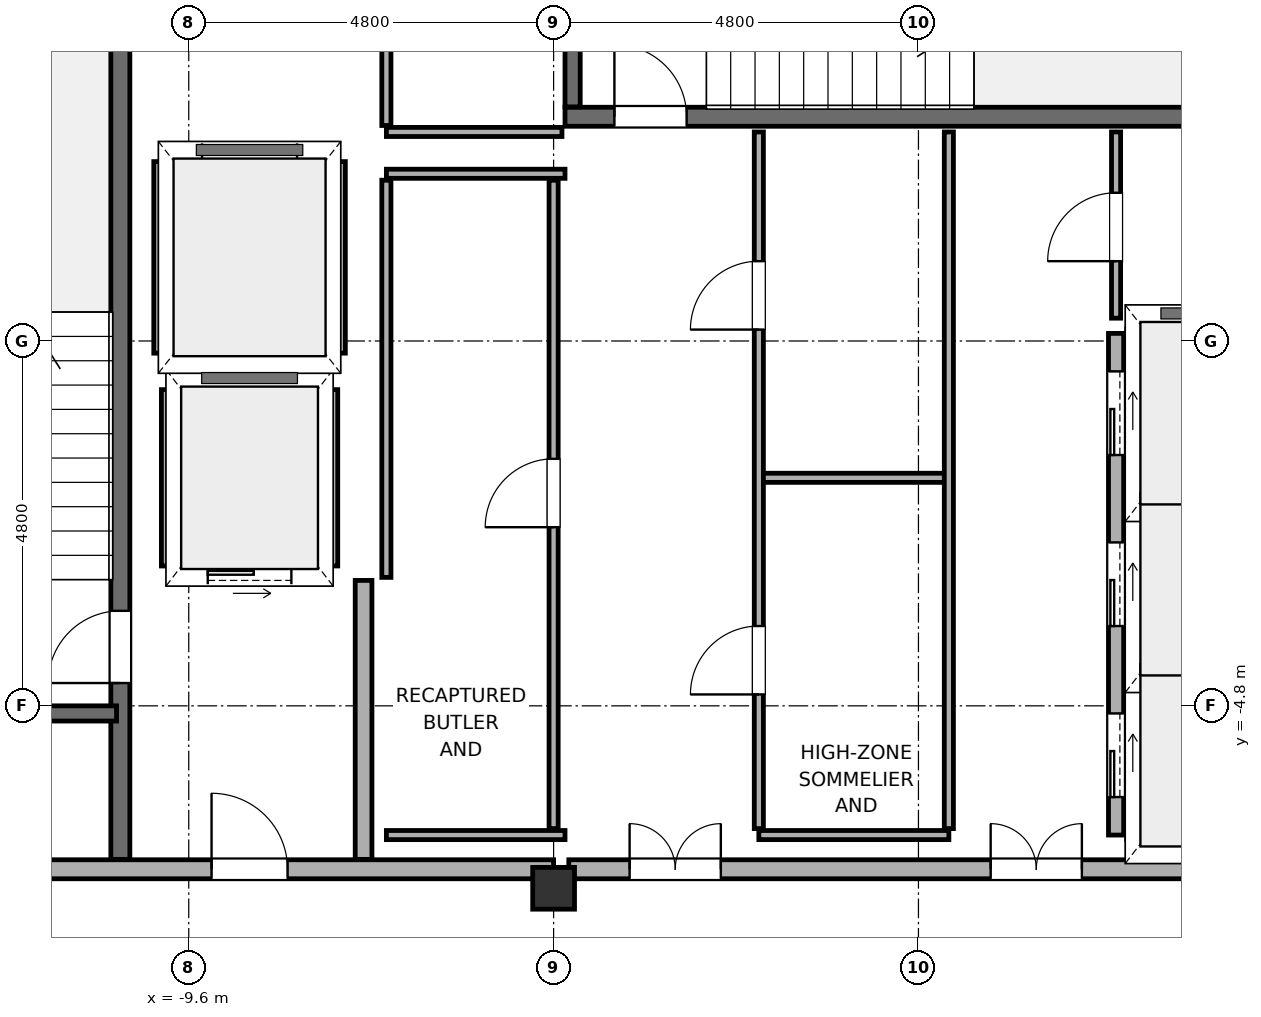
"""IFC4 building model, lengths in metres.
Left out: names, types, materials, properties, quantities, classifications, styles, units other than length and angle.
Written with IfcOpenShell. Run it as: python <this file> out.ifc"""

import sys

from ifc_helpers import new_model, si_unit, direction, frame, frame_2d, origin, origin_2d, place, context, subcontext, project, spatial, rectangle, hollow_rectangle, extrude, element, fill, save


model = new_model("IFC4")
c1 = context("Model", 3, precision=1e-05, world=origin(), true_north=direction((0.0, 1.0)))
c2 = subcontext(c1, "Body", "Model", "MODEL_VIEW")
j1 = project(units=[si_unit("LENGTHUNIT", "METRE"), si_unit("PLANEANGLEUNIT", "RADIAN")], contexts=[c1])
p1 = place(None, origin())
s1 = spatial("IfcSite", under=j1, at=p1, CompositionType="ELEMENT")
p2 = place(p1, origin())
s2 = spatial("IfcBuilding", under=s1, at=p2, CompositionType="ELEMENT")
p3 = place(p2, frame((0.0, 0.0, 282.2)))
s3 = spatial("IfcBuildingStorey", under=s2, at=p3, CompositionType="ELEMENT", Elevation=282.2)
p4 = place(p3, frame((-4.8, -7.2, 0.0), z_axis=(0.0, 0.0, 1.0), x_axis=(1.0, 0.0, 0.0)))
e1 = element("IfcColumn", 1, at=p4, inside=s3, PredefinedType="COLUMN", context=c2, shape_type="SweptSolid", body=[
    extrude(hollow_rectangle(XDim=0.55, YDim=0.55, WallThickness=0.025, at=origin_2d()), origin(), (0.0, 0.0, 1.0), 4.2),
])
p5 = place(p3, frame((-14.2, -6.95, 0.0), z_axis=(0.0, 0.0, 1.0), x_axis=(1.0, 0.0, 0.0)))
e2 = element("IfcWall", 2, at=p5, inside=s3, PredefinedType="SOLIDWALL", context=c2, shape_type="SweptSolid", body=[
    extrude(rectangle(XDim=9.4, YDim=0.25, at=frame_2d((4.7, 0.0))), origin(), (0.0, 0.0, 1.0), 2.6),
])
p6 = place(p5, frame((4.9, 0.0, 0.0)))
e3 = element("IfcOpeningElement", 3, at=p6, cuts=e2, PredefinedType="OPENING", context=c2, shape_type="SweptSolid", body=[
    extrude(rectangle(XDim=1.0, YDim=2.15, at=frame_2d((0.5, 1.075))), frame((0.0, 0.14, 0.0), z_axis=(0.0, -1.0, 0.0), x_axis=(1.0, 0.0, 0.0)), (0.0, 0.0, 1.0), 0.28),
])
p7 = place(p3, frame((-4.6, -6.95, 0.0), z_axis=(0.0, 0.0, 1.0), x_axis=(1.0, 0.0, 0.0)))
e4 = element("IfcWall", 4, at=p7, inside=s3, PredefinedType="SOLIDWALL", context=c2, shape_type="SweptSolid", body=[
    extrude(rectangle(XDim=9.2, YDim=0.25, at=frame_2d((4.6, 0.0))), origin(), (0.0, 0.0, 1.0), 2.8),
])
p8 = place(p7, frame((0.8, 0.0, 0.0)))
e5 = element("IfcOpeningElement", 5, at=p8, cuts=e4, PredefinedType="OPENING", context=c2, shape_type="SweptSolid", body=[
    extrude(rectangle(XDim=1.2, YDim=2.2, at=frame_2d((0.6, 1.1))), frame((0.0, 0.14, 0.0), z_axis=(0.0, -1.0, 0.0), x_axis=(1.0, 0.0, 0.0)), (0.0, 0.0, 1.0), 0.28),
])
p9 = place(p7, frame((5.55, 0.0, 0.0)))
e6 = element("IfcOpeningElement", 6, at=p9, cuts=e4, PredefinedType="OPENING", context=c2, shape_type="SweptSolid", body=[
    extrude(rectangle(XDim=1.2, YDim=2.2, at=frame_2d((0.6, 1.1))), frame((0.0, 0.14, 0.0), z_axis=(0.0, -1.0, 0.0), x_axis=(1.0, 0.0, 0.0)), (0.0, 0.0, 1.0), 0.28),
])
p10 = place(p3, frame((-7.3, -6.82, 0.0), z_axis=(0.0, 0.0, 1.0), x_axis=(0.0, 1.0, 0.0)))
e7 = element("IfcWall", 7, at=p10, inside=s3, PredefinedType="SOLIDWALL", context=c2, shape_type="SweptSolid", body=[
    extrude(rectangle(XDim=3.67, YDim=0.22, at=frame_2d((1.835, 0.0))), origin(), (0.0, 0.0, 1.0), 2.6),
])
p11 = place(p3, frame((-10.5, -6.82, -0.2), z_axis=(0.0, 0.0, 1.0), x_axis=(0.0, 1.0, 0.0)))
e8 = element("IfcWall", 8, at=p11, inside=s3, PredefinedType="SOLIDWALL", context=c2, shape_type="SweptSolid", body=[
    extrude(rectangle(XDim=13.64, YDim=0.25, at=frame_2d((6.82, 0.0))), origin(), (0.0, 0.0, 1.0), 4.2),
])
p12 = place(p11, frame((2.32, 0.0, 0.2)))
e9 = element("IfcOpeningElement", 9, at=p12, cuts=e8, PredefinedType="OPENING", context=c2, shape_type="SweptSolid", body=[
    extrude(rectangle(XDim=0.95, YDim=2.15, at=frame_2d((0.475, 1.075))), frame((0.0, 0.14, 0.0), z_axis=(0.0, -1.0, 0.0), x_axis=(1.0, 0.0, 0.0)), (0.0, 0.0, 1.0), 0.28),
])
p13 = place(p3, frame((-14.2, -4.9, -0.2), z_axis=(0.0, 0.0, 1.0), x_axis=(1.0, 0.0, 0.0)))
e10 = element("IfcWall", 10, at=p13, inside=s3, PredefinedType="SOLIDWALL", context=c2, shape_type="SweptSolid", body=[
    extrude(rectangle(XDim=3.65, YDim=0.2, at=frame_2d((1.825, 0.0))), origin(), (0.0, 0.0, 1.0), 4.2),
])
p14 = place(p3, frame((-4.65, 2.95, -0.2), z_axis=(0.0, 0.0, 1.0), x_axis=(1.0, 0.0, 0.0)))
e11 = element("IfcWall", 11, at=p14, inside=s3, PredefinedType="SOLIDWALL", context=c2, shape_type="SweptSolid", body=[
    extrude(rectangle(XDim=9.9, YDim=0.25, at=frame_2d((4.95, 0.0))), origin(), (0.0, 0.0, 1.0), 4.2),
])
p15 = place(p14, frame((0.65, 0.0, 0.2)))
e12 = element("IfcOpeningElement", 12, at=p15, cuts=e11, PredefinedType="OPENING", context=c2, shape_type="SweptSolid", body=[
    extrude(rectangle(XDim=0.95, YDim=2.15, at=frame_2d((0.475, 1.075))), frame((0.0, 0.14, 0.0), z_axis=(0.0, -1.0, 0.0), x_axis=(1.0, 0.0, 0.0)), (0.0, 0.0, 1.0), 0.28),
])
p16 = place(p3, frame((-4.55, 3.08, -0.2), z_axis=(0.0, 0.0, 1.0), x_axis=(0.0, 1.0, 0.0)))
e13 = element("IfcWall", 13, at=p16, inside=s3, PredefinedType="SOLIDWALL", context=c2, shape_type="SweptSolid", body=[
    extrude(rectangle(XDim=3.74, YDim=0.2, at=frame_2d((1.87, 0.0))), origin(), (0.0, 0.0, 1.0), 4.2),
])
p17 = place(p3, frame((2.6, -6.5, 0.0), z_axis=(0.0, 0.0, 1.0), x_axis=(0.0, 1.0, 0.0)))
e14 = element("IfcWall", 14, at=p17, inside=s3, PredefinedType="SOLIDWALL", context=c2, shape_type="SweptSolid", body=[
    extrude(rectangle(XDim=6.6, YDim=0.2, at=frame_2d((3.3, 0.0))), origin(), (0.0, 0.0, 1.0), 4.0),
])
p18 = place(p17, frame((0.5, 0.0, 0.0)))
e15 = element("IfcOpeningElement", 15, at=p18, cuts=e14, PredefinedType="OPENING", context=c2, shape_type="SweptSolid", body=[
    extrude(rectangle(XDim=1.1, YDim=2.2, at=frame_2d((0.55, 1.1))), frame((0.0, 0.115, 0.0), z_axis=(0.0, -1.0, 0.0), x_axis=(1.0, 0.0, 0.0)), (0.0, 0.0, 1.0), 0.23),
])
p19 = place(p17, frame((2.75, 0.0, 0.0)))
e16 = element("IfcOpeningElement", 16, at=p19, cuts=e14, PredefinedType="OPENING", context=c2, shape_type="SweptSolid", body=[
    extrude(rectangle(XDim=1.1, YDim=2.2, at=frame_2d((0.55, 1.1))), frame((0.0, 0.115, 0.0), z_axis=(0.0, -1.0, 0.0), x_axis=(1.0, 0.0, 0.0)), (0.0, 0.0, 1.0), 0.23),
])
p20 = place(p17, frame((5.0, 0.0, 0.0)))
e17 = element("IfcOpeningElement", 17, at=p20, cuts=e14, PredefinedType="OPENING", context=c2, shape_type="SweptSolid", body=[
    extrude(rectangle(XDim=1.1, YDim=2.2, at=frame_2d((0.55, 1.1))), frame((0.0, 0.115, 0.0), z_axis=(0.0, -1.0, 0.0), x_axis=(1.0, 0.0, 0.0)), (0.0, 0.0, 1.0), 0.23),
])
for number, where, z_axis, x_axis in (
    (18, (2.74, -6.5, 0.0), (0.0, 0.0, 1.0), (1.0, 0.0, 0.0)),
    (19, (2.74, -4.325, 0.0), (0.0, 0.0, 1.0), (1.0, 0.0, 0.0)),
    (20, (2.74, -2.075, 0.0), (0.0, 0.0, 1.0), (1.0, 0.0, 0.0)),
    (21, (2.74, 0.1, 0.0), (0.0, 0.0, 1.0), (1.0, 0.0, 0.0)),
):
    element("IfcWall", number, at=place(p3, frame(where, z_axis=z_axis, x_axis=x_axis)), inside=s3, PredefinedType="PARTITIONING", context=c2, shape_type="SweptSolid", body=[
        extrude(rectangle(XDim=2.17, YDim=0.12, at=frame_2d((1.085, 0.0))), origin(), (0.0, 0.0, 1.0), 4.0),
    ])
p21 = place(p3, frame((-9.82, -3.1, 0.0), z_axis=(0.0, 0.0, 1.0), x_axis=(1.0, 0.0, 0.0)))
e22 = element("IfcWall", 22, at=p21, inside=s3, PredefinedType="SOLIDWALL", context=c2, shape_type="SweptSolid", body=[
    extrude(rectangle(XDim=2.04, YDim=0.2, at=frame_2d((1.02, 0.0))), origin(), (0.0, 0.0, 1.0), 4.0),
])
p22 = place(p21, frame((0.47, 0.0, 0.0)))
e23 = element("IfcOpeningElement", 23, at=p22, cuts=e22, PredefinedType="OPENING", context=c2, shape_type="SweptSolid", body=[
    extrude(rectangle(XDim=1.1, YDim=2.2, at=frame_2d((0.55, 1.1))), frame((0.0, 0.115, 0.0), z_axis=(0.0, -1.0, 0.0), x_axis=(1.0, 0.0, 0.0)), (0.0, 0.0, 1.0), 0.23),
])
p23 = place(p3, frame((-9.82, -0.5, 0.0), z_axis=(0.0, 0.0, 1.0), x_axis=(1.0, 0.0, 0.0)))
e24 = element("IfcWall", 24, at=p23, inside=s3, PredefinedType="SOLIDWALL", context=c2, shape_type="SweptSolid", body=[
    extrude(rectangle(XDim=2.04, YDim=0.2, at=frame_2d((1.02, 0.0))), origin(), (0.0, 0.0, 1.0), 4.0),
])
for number, where, z_axis, x_axis in (
    (25, (-9.9, -2.96, 0.0), (0.0, 0.0, 1.0), (0.0, 1.0, 0.0)),
    (26, (-7.7, -2.96, 0.0), (0.0, 0.0, 1.0), (0.0, 1.0, 0.0)),
):
    element("IfcWall", number, at=place(p3, frame(where, z_axis=z_axis, x_axis=x_axis)), inside=s3, PredefinedType="PARTITIONING", context=c2, shape_type="SweptSolid", body=[
        extrude(rectangle(XDim=2.32, YDim=0.12, at=frame_2d((1.16, 0.0))), origin(), (0.0, 0.0, 1.0), 4.0),
    ])
p24 = place(p3, frame((-9.92, 2.5, 0.0), z_axis=(0.0, 0.0, 1.0), x_axis=(1.0, 0.0, 0.0)))
e27 = element("IfcWall", 27, at=p24, inside=s3, PredefinedType="SOLIDWALL", context=c2, shape_type="SweptSolid", body=[
    extrude(rectangle(XDim=2.24, YDim=0.2, at=frame_2d((1.12, 0.0))), origin(), (0.0, 0.0, 1.0), 4.0),
])
p25 = place(p24, frame((0.495, 0.0, 0.0)))
e28 = element("IfcOpeningElement", 28, at=p25, cuts=e27, PredefinedType="OPENING", context=c2, shape_type="SweptSolid", body=[
    extrude(rectangle(XDim=1.25, YDim=2.25, at=frame_2d((0.625, 1.125))), frame((0.0, 0.115, 0.0), z_axis=(0.0, -1.0, 0.0), x_axis=(1.0, 0.0, 0.0)), (0.0, 0.0, 1.0), 0.23),
])
p26 = place(p3, frame((-9.92, -0.3, 0.0), z_axis=(0.0, 0.0, 1.0), x_axis=(1.0, 0.0, 0.0)))
e29 = element("IfcWall", 29, at=p26, inside=s3, PredefinedType="SOLIDWALL", context=c2, shape_type="SweptSolid", body=[
    extrude(rectangle(XDim=2.24, YDim=0.2, at=frame_2d((1.12, 0.0))), origin(), (0.0, 0.0, 1.0), 4.0),
])
for number, where, z_axis, x_axis in (
    (30, (-10.0, -0.16, 0.0), (0.0, 0.0, 1.0), (0.0, 1.0, 0.0)),
    (31, (-7.6, -0.16, 0.0), (0.0, 0.0, 1.0), (0.0, 1.0, 0.0)),
):
    element("IfcWall", number, at=place(p3, frame(where, z_axis=z_axis, x_axis=x_axis)), inside=s3, PredefinedType="PARTITIONING", context=c2, shape_type="SweptSolid", body=[
        extrude(rectangle(XDim=2.52, YDim=0.12, at=frame_2d((1.26, 0.0))), origin(), (0.0, 0.0, 1.0), 4.0),
    ])
p27 = place(p3, frame((-7.0, -6.5, 0.0), z_axis=(0.0, 0.0, 1.0), x_axis=(1.0, 0.0, 0.0)))
e32 = element("IfcWall", 32, at=p27, inside=s3, PredefinedType="PARTITIONING", context=c2, shape_type="SweptSolid", body=[
    extrude(rectangle(XDim=2.35, YDim=0.12, at=frame_2d((1.175, 0.0))), origin(), (0.0, 0.0, 1.0), 4.0),
])
for number, where, z_axis, x_axis in (
    (33, (-2.1, -6.5, 0.0), (0.0, 0.0, 1.0), (1.0, 0.0, 0.0)),
    (34, (-2.1, -1.8, 0.0), (0.0, 0.0, 1.0), (1.0, 0.0, 0.0)),
):
    element("IfcWall", number, at=place(p3, frame(where, z_axis=z_axis, x_axis=x_axis)), inside=s3, PredefinedType="PARTITIONING", context=c2, shape_type="SweptSolid", body=[
        extrude(rectangle(XDim=2.5, YDim=0.12, at=frame_2d((1.25, 0.0))), origin(), (0.0, 0.0, 1.0), 4.0),
    ])
p28 = place(p3, frame((-7.0, 2.2, 0.0), z_axis=(0.0, 0.0, 1.0), x_axis=(1.0, 0.0, 0.0)))
e35 = element("IfcWall", 35, at=p28, inside=s3, PredefinedType="PARTITIONING", context=c2, shape_type="SweptSolid", body=[
    extrude(rectangle(XDim=2.35, YDim=0.12, at=frame_2d((1.175, 0.0))), origin(), (0.0, 0.0, 1.0), 4.0),
])
p29 = place(p3, frame((-7.0, 2.75, 0.0), z_axis=(0.0, 0.0, 1.0), x_axis=(1.0, 0.0, 0.0)))
e36 = element("IfcWall", 36, at=p29, inside=s3, PredefinedType="PARTITIONING", context=c2, shape_type="SweptSolid", body=[
    extrude(rectangle(XDim=2.31, YDim=0.12, at=frame_2d((1.155, 0.0))), origin(), (0.0, 0.0, 1.0), 4.0),
])
p30 = place(p3, frame((-7.0, -3.11, 0.0), z_axis=(0.0, 0.0, 1.0), x_axis=(0.0, 1.0, 0.0)))
e37 = element("IfcWall", 37, at=p30, inside=s3, PredefinedType="PARTITIONING", context=c2, shape_type="SweptSolid", body=[
    extrude(rectangle(XDim=5.225, YDim=0.12, at=frame_2d((2.613, 0.0))), origin(), (0.0, 0.0, 1.0), 4.0),
])
p31 = place(p3, frame((-7.0, 2.835, 0.0), z_axis=(0.0, 0.0, 1.0), x_axis=(0.0, 1.0, 0.0)))
e38 = element("IfcWall", 38, at=p31, inside=s3, PredefinedType="PARTITIONING", context=c2, shape_type="SweptSolid", body=[
    extrude(rectangle(XDim=3.715, YDim=0.12, at=frame_2d((1.857, 0.0))), origin(), (0.0, 0.0, 1.0), 4.0),
])
p32 = place(p31, frame((1.365, 0.0, 0.0)))
e39 = element("IfcOpeningElement", 39, at=p32, cuts=e38, PredefinedType="OPENING", context=c2, shape_type="SweptSolid", body=[
    extrude(rectangle(XDim=0.9, YDim=2.1, at=frame_2d((0.45, 1.05))), frame((0.0, 0.075, 0.0), z_axis=(0.0, -1.0, 0.0), x_axis=(1.0, 0.0, 0.0)), (0.0, 0.0, 1.0), 0.15),
])
p33 = place(p3, frame((-4.8, -6.415, 0.0), z_axis=(0.0, 0.0, 1.0), x_axis=(0.0, 1.0, 0.0)))
e40 = element("IfcWall", 40, at=p33, inside=s3, PredefinedType="PARTITIONING", context=c2, shape_type="SweptSolid", body=[
    extrude(rectangle(XDim=8.53, YDim=0.12, at=frame_2d((4.265, 0.0))), origin(), (0.0, 0.0, 1.0), 4.0),
])
p34 = place(p33, frame((3.965, 0.0, 0.0)))
e41 = element("IfcOpeningElement", 41, at=p34, cuts=e40, PredefinedType="OPENING", context=c2, shape_type="SweptSolid", body=[
    extrude(rectangle(XDim=0.9, YDim=2.1, at=frame_2d((0.45, 1.05))), frame((0.0, 0.075, 0.0), z_axis=(0.0, -1.0, 0.0), x_axis=(1.0, 0.0, 0.0)), (0.0, 0.0, 1.0), 0.15),
])
p35 = place(p3, frame((-2.1, -6.415, 0.0), z_axis=(0.0, 0.0, 1.0), x_axis=(0.0, 1.0, 0.0)))
e42 = element("IfcWall", 42, at=p35, inside=s3, PredefinedType="PARTITIONING", context=c2, shape_type="SweptSolid", body=[
    extrude(rectangle(XDim=9.165, YDim=0.12, at=frame_2d((4.583, 0.0))), origin(), (0.0, 0.0, 1.0), 4.0),
])
p36 = place(p35, frame((1.765, 0.0, 0.0)))
e43 = element("IfcOpeningElement", 43, at=p36, cuts=e42, PredefinedType="OPENING", context=c2, shape_type="SweptSolid", body=[
    extrude(rectangle(XDim=0.9, YDim=2.1, at=frame_2d((0.45, 1.05))), frame((0.0, 0.075, 0.0), z_axis=(0.0, -1.0, 0.0), x_axis=(1.0, 0.0, 0.0)), (0.0, 0.0, 1.0), 0.15),
])
p37 = place(p35, frame((6.565, 0.0, 0.0)))
e44 = element("IfcOpeningElement", 44, at=p37, cuts=e42, PredefinedType="OPENING", context=c2, shape_type="SweptSolid", body=[
    extrude(rectangle(XDim=0.9, YDim=2.1, at=frame_2d((0.45, 1.05))), frame((0.0, 0.075, 0.0), z_axis=(0.0, -1.0, 0.0), x_axis=(1.0, 0.0, 0.0)), (0.0, 0.0, 1.0), 0.15),
])
p38 = place(p3, frame((0.4, -6.415, 0.0), z_axis=(0.0, 0.0, 1.0), x_axis=(0.0, 1.0, 0.0)))
e45 = element("IfcWall", 45, at=p38, inside=s3, PredefinedType="PARTITIONING", context=c2, shape_type="SweptSolid", body=[
    extrude(rectangle(XDim=9.165, YDim=0.12, at=frame_2d((4.583, 0.0))), origin(), (0.0, 0.0, 1.0), 4.0),
])
p39 = place(p3, frame((2.6, 0.3, 0.0), z_axis=(0.0, 0.0, 1.0), x_axis=(0.0, 1.0, 0.0)))
e46 = element("IfcWall", 46, at=p39, inside=s3, PredefinedType="PARTITIONING", context=c2, shape_type="SweptSolid", body=[
    extrude(rectangle(XDim=2.45, YDim=0.12, at=frame_2d((1.225, 0.0))), origin(), (0.0, 0.0, 1.0), 4.0),
])
p40 = place(p39, frame((0.75, 0.0, 0.0)))
e47 = element("IfcOpeningElement", 47, at=p40, cuts=e46, PredefinedType="OPENING", context=c2, shape_type="SweptSolid", body=[
    extrude(rectangle(XDim=0.9, YDim=2.1, at=frame_2d((0.45, 1.05))), frame((0.0, 0.075, 0.0), z_axis=(0.0, -1.0, 0.0), x_axis=(1.0, 0.0, 0.0)), (0.0, 0.0, 1.0), 0.15),
])
p41 = place(p6, origin())
e48 = element("IfcDoor", 48, at=p41, inside=s3, OperationType="SINGLE_SWING_RIGHT", PredefinedType="DOOR", context=c2, shape_type="SweptSolid", body=[
    extrude(rectangle(XDim=1.0, YDim=2.15, at=frame_2d((0.5, 1.075))), frame((0.0, 0.025, 0.0), z_axis=(0.0, -1.0, 0.0), x_axis=(1.0, 0.0, 0.0)), (0.0, 0.0, 1.0), 0.05),
])
fill(e3, e48)
p42 = place(p8, origin())
e49 = element("IfcDoor", 49, at=p42, inside=s3, OperationType="DOUBLE_DOOR_SINGLE_SWING", PredefinedType="DOOR", context=c2, shape_type="SweptSolid", body=[
    extrude(rectangle(XDim=1.2, YDim=2.2, at=frame_2d((0.6, 1.1))), frame((0.0, 0.025, 0.0), z_axis=(0.0, -1.0, 0.0), x_axis=(1.0, 0.0, 0.0)), (0.0, 0.0, 1.0), 0.05),
])
fill(e5, e49)
p43 = place(p9, origin())
e50 = element("IfcDoor", 50, at=p43, inside=s3, OperationType="DOUBLE_DOOR_SINGLE_SWING", PredefinedType="DOOR", context=c2, shape_type="SweptSolid", body=[
    extrude(rectangle(XDim=1.2, YDim=2.2, at=frame_2d((0.6, 1.1))), frame((0.0, 0.025, 0.0), z_axis=(0.0, -1.0, 0.0), x_axis=(1.0, 0.0, 0.0)), (0.0, 0.0, 1.0), 0.05),
])
fill(e6, e50)
p44 = place(p12, origin())
e51 = element("IfcDoor", 51, at=p44, inside=s3, OperationType="SINGLE_SWING_LEFT", PredefinedType="DOOR", context=c2, shape_type="SweptSolid", body=[
    extrude(rectangle(XDim=0.95, YDim=2.15, at=frame_2d((0.475, 1.075))), frame((0.0, 0.025, 0.0), z_axis=(0.0, -1.0, 0.0), x_axis=(1.0, 0.0, 0.0)), (0.0, 0.0, 1.0), 0.05),
])
fill(e9, e51)
p45 = place(p15, origin())
e52 = element("IfcDoor", 52, at=p45, inside=s3, OperationType="SINGLE_SWING_RIGHT", PredefinedType="DOOR", context=c2, shape_type="SweptSolid", body=[
    extrude(rectangle(XDim=0.95, YDim=2.15, at=frame_2d((0.475, 1.075))), frame((0.0, 0.025, 0.0), z_axis=(0.0, -1.0, 0.0), x_axis=(1.0, 0.0, 0.0)), (0.0, 0.0, 1.0), 0.05),
])
fill(e12, e52)
p46 = place(p18, origin())
e53 = element("IfcDoor", 53, at=p46, inside=s3, OperationType="SLIDING_TO_LEFT", PredefinedType="DOOR", context=c2, shape_type="SweptSolid", body=[
    extrude(rectangle(XDim=1.1, YDim=2.2, at=frame_2d((0.55, 1.1))), frame((0.0, 0.025, 0.0), z_axis=(0.0, -1.0, 0.0), x_axis=(1.0, 0.0, 0.0)), (0.0, 0.0, 1.0), 0.05),
])
fill(e15, e53)
p47 = place(p19, origin())
e54 = element("IfcDoor", 54, at=p47, inside=s3, OperationType="SLIDING_TO_LEFT", PredefinedType="DOOR", context=c2, shape_type="SweptSolid", body=[
    extrude(rectangle(XDim=1.1, YDim=2.2, at=frame_2d((0.55, 1.1))), frame((0.0, 0.025, 0.0), z_axis=(0.0, -1.0, 0.0), x_axis=(1.0, 0.0, 0.0)), (0.0, 0.0, 1.0), 0.05),
])
fill(e16, e54)
p48 = place(p20, origin())
e55 = element("IfcDoor", 55, at=p48, inside=s3, OperationType="SLIDING_TO_LEFT", PredefinedType="DOOR", context=c2, shape_type="SweptSolid", body=[
    extrude(rectangle(XDim=1.1, YDim=2.2, at=frame_2d((0.55, 1.1))), frame((0.0, 0.025, 0.0), z_axis=(0.0, -1.0, 0.0), x_axis=(1.0, 0.0, 0.0)), (0.0, 0.0, 1.0), 0.05),
])
fill(e17, e55)
p49 = place(p22, origin())
e56 = element("IfcDoor", 56, at=p49, inside=s3, OperationType="SLIDING_TO_LEFT", PredefinedType="DOOR", context=c2, shape_type="SweptSolid", body=[
    extrude(rectangle(XDim=1.1, YDim=2.2, at=frame_2d((0.55, 1.1))), frame((0.0, 0.025, 0.0), z_axis=(0.0, -1.0, 0.0), x_axis=(1.0, 0.0, 0.0)), (0.0, 0.0, 1.0), 0.05),
])
fill(e23, e56)
p50 = place(p25, origin())
e57 = element("IfcDoor", 57, at=p50, inside=s3, OperationType="SLIDING_TO_LEFT", PredefinedType="DOOR", context=c2, shape_type="SweptSolid", body=[
    extrude(rectangle(XDim=1.25, YDim=2.25, at=frame_2d((0.625, 1.125))), frame((0.0, 0.025, 0.0), z_axis=(0.0, -1.0, 0.0), x_axis=(1.0, 0.0, 0.0)), (0.0, 0.0, 1.0), 0.05),
])
fill(e28, e57)
p51 = place(p34, origin())
e58 = element("IfcDoor", 58, at=p51, inside=s3, OperationType="SINGLE_SWING_LEFT", PredefinedType="DOOR", context=c2, shape_type="SweptSolid", body=[
    extrude(rectangle(XDim=0.9, YDim=2.1, at=frame_2d((0.45, 1.05))), frame((0.0, 0.025, 0.0), z_axis=(0.0, -1.0, 0.0), x_axis=(1.0, 0.0, 0.0)), (0.0, 0.0, 1.0), 0.05),
])
fill(e41, e58)
p52 = place(p36, origin())
e59 = element("IfcDoor", 59, at=p52, inside=s3, OperationType="SINGLE_SWING_LEFT", PredefinedType="DOOR", context=c2, shape_type="SweptSolid", body=[
    extrude(rectangle(XDim=0.9, YDim=2.1, at=frame_2d((0.45, 1.05))), frame((0.0, 0.025, 0.0), z_axis=(0.0, -1.0, 0.0), x_axis=(1.0, 0.0, 0.0)), (0.0, 0.0, 1.0), 0.05),
])
fill(e43, e59)
p53 = place(p37, origin())
e60 = element("IfcDoor", 60, at=p53, inside=s3, OperationType="SINGLE_SWING_RIGHT", PredefinedType="DOOR", context=c2, shape_type="SweptSolid", body=[
    extrude(rectangle(XDim=0.9, YDim=2.1, at=frame_2d((0.45, 1.05))), frame((0.0, 0.025, 0.0), z_axis=(0.0, -1.0, 0.0), x_axis=(1.0, 0.0, 0.0)), (0.0, 0.0, 1.0), 0.05),
])
fill(e44, e60)
p54 = place(p40, origin())
e61 = element("IfcDoor", 61, at=p54, inside=s3, OperationType="SINGLE_SWING_LEFT", PredefinedType="DOOR", context=c2, shape_type="SweptSolid", body=[
    extrude(rectangle(XDim=0.9, YDim=2.1, at=frame_2d((0.45, 1.05))), frame((0.0, 0.025, 0.0), z_axis=(0.0, -1.0, 0.0), x_axis=(1.0, 0.0, 0.0)), (0.0, 0.0, 1.0), 0.05),
])
fill(e47, e61)
save(model, sys.argv[1])
